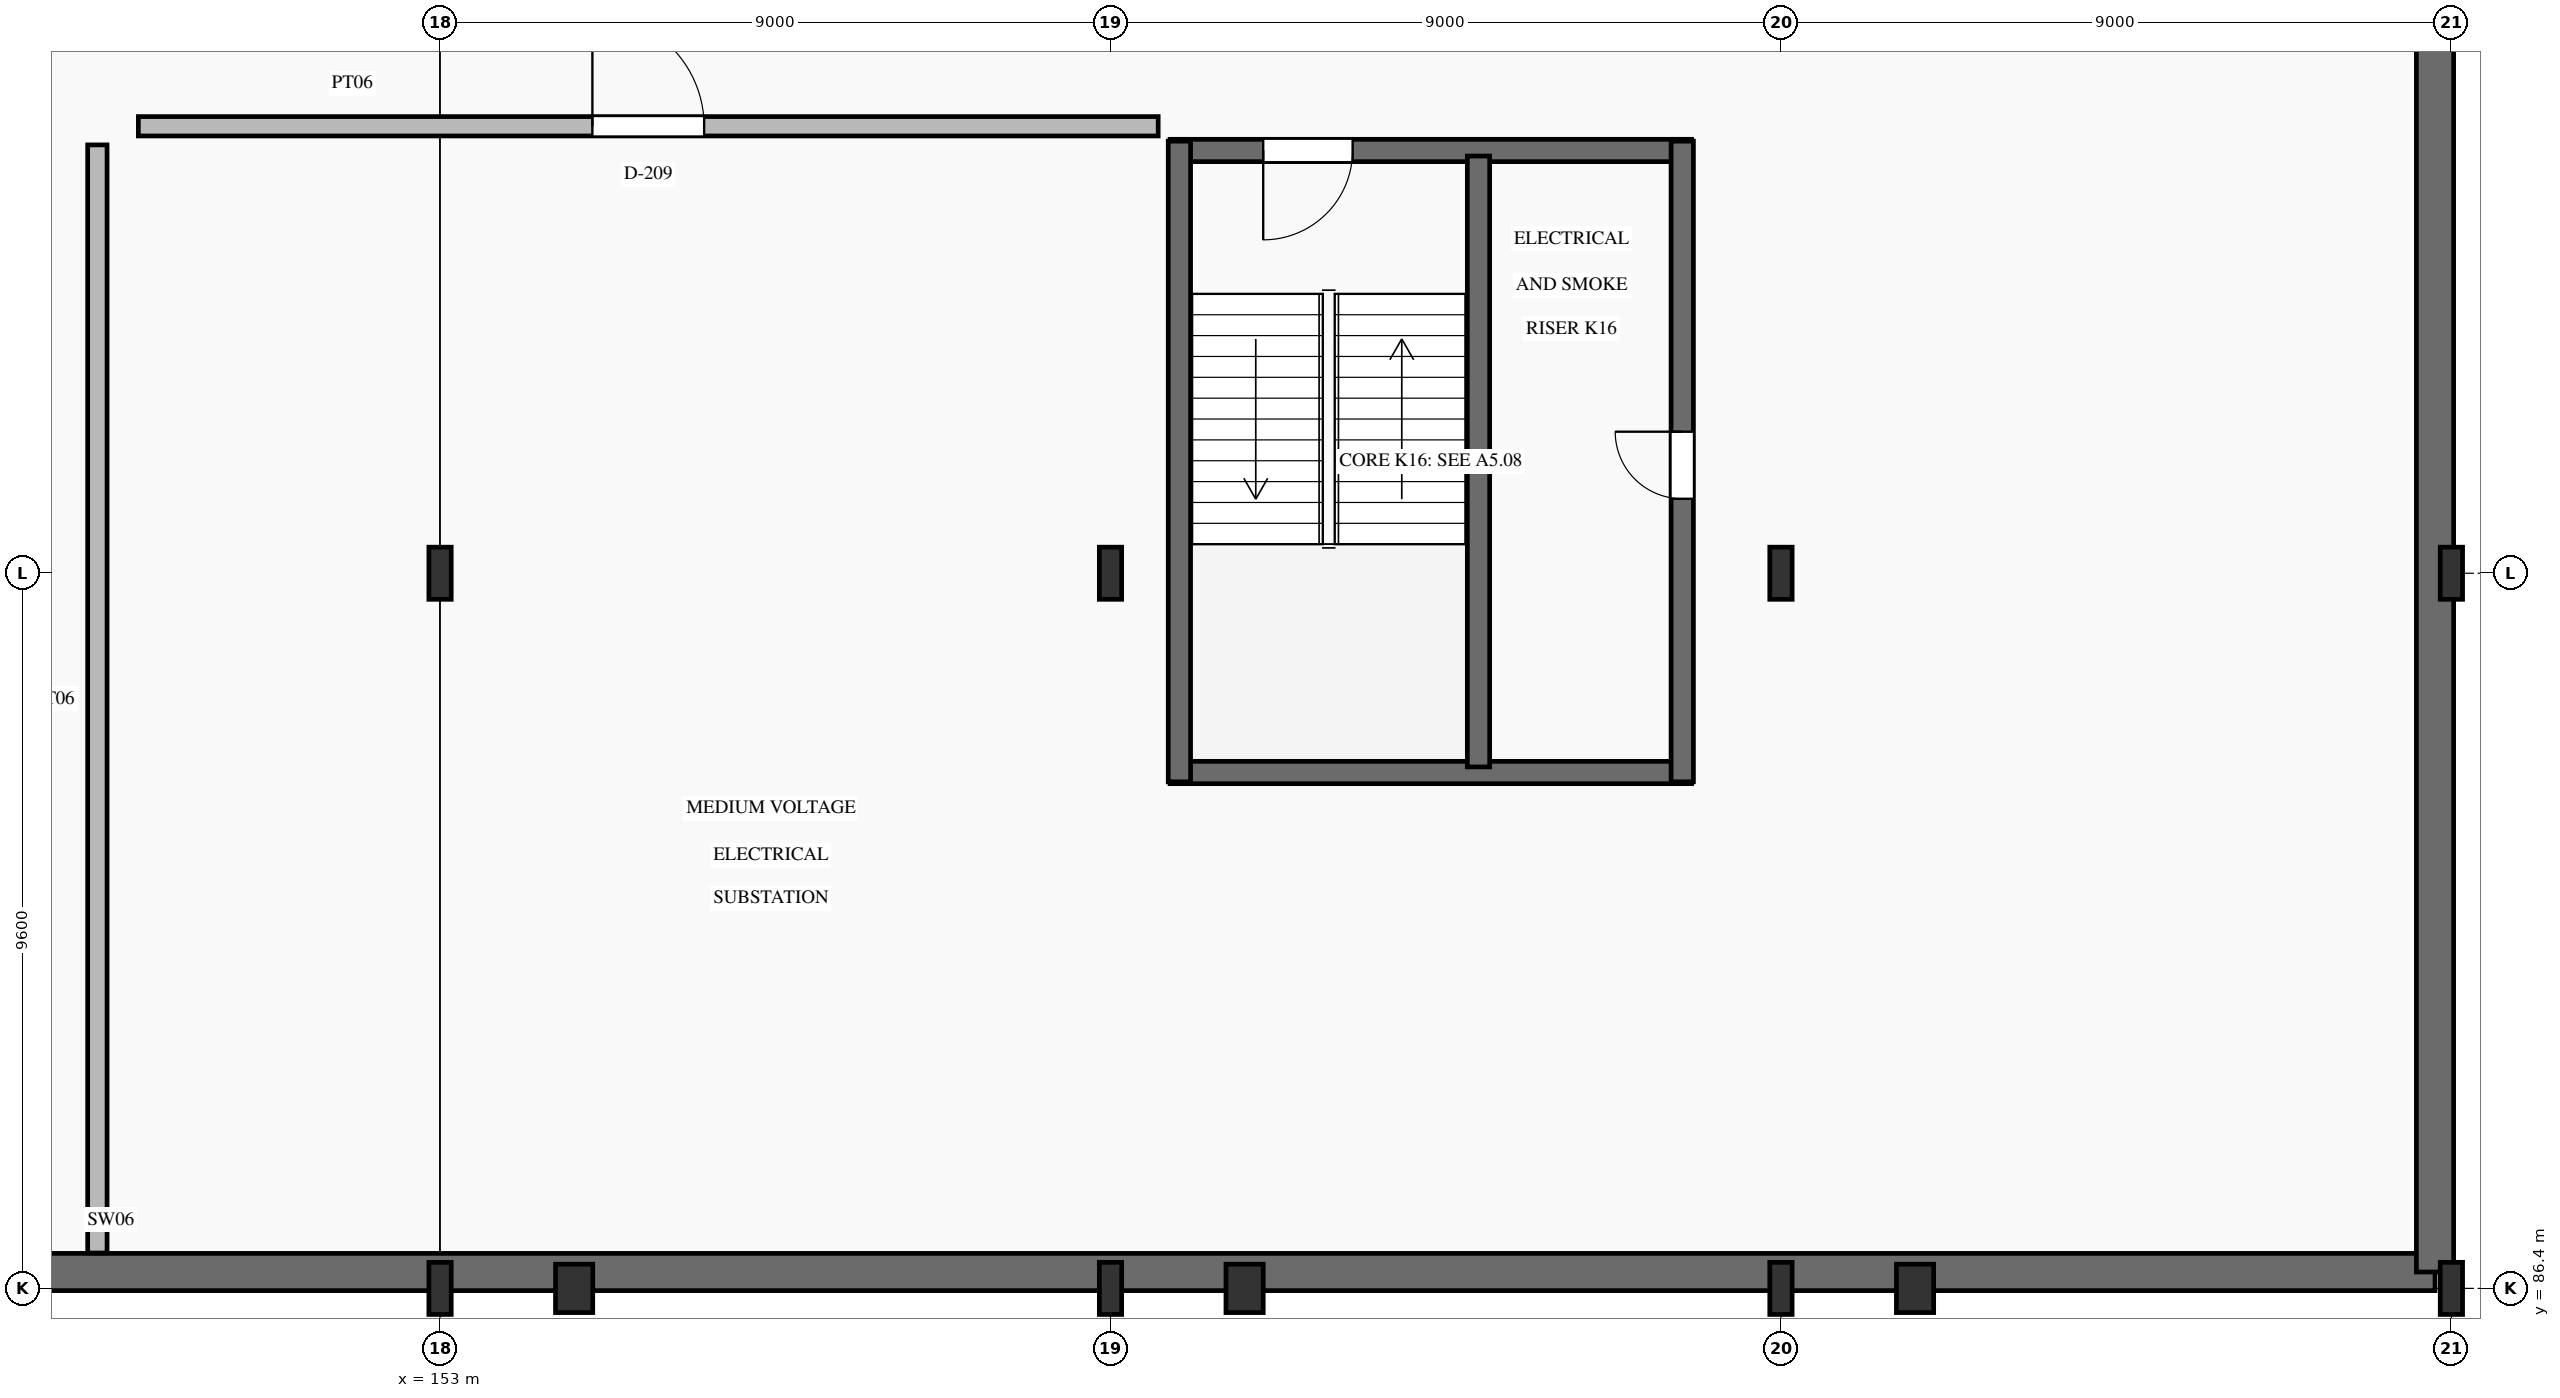
"""IFC4 building model, lengths in metres.
Left out: names, types, materials, properties, quantities, classifications, styles, units other than length and angle.
Written with IfcOpenShell. Run it as: python <this file> out.ifc"""

import sys

from ifc_helpers import new_model, si_unit, direction, frame, frame_2d, origin, origin_2d, place, context, subcontext, project, spatial, rectangle, i_section, extrude, element, fill, save


model = new_model("IFC4")
c1 = context("Model", 3, precision=1e-05, world=origin(), true_north=direction((0.0, 1.0)))
c2 = subcontext(c1, "Body", "Model", "MODEL_VIEW")
j1 = project(units=[si_unit("LENGTHUNIT", "METRE"), si_unit("PLANEANGLEUNIT", "RADIAN")], contexts=[c1])
p1 = place(None, origin())
s1 = spatial("IfcSite", under=j1, at=p1, CompositionType="ELEMENT")
p2 = place(p1, origin())
s2 = spatial("IfcBuilding", under=s1, at=p2, CompositionType="ELEMENT")
p3 = place(p2, frame((0.0, 0.0, -4.5)))
s3 = spatial("IfcBuildingStorey", under=s2, at=p3, CompositionType="ELEMENT", Elevation=-4.5)
for number, where, z_axis, x_axis in (
    (1, (153.0, 86.4, 0.0), (0.0, 0.0, 1.0), (1.0, 0.0, 0.0)),
    (2, (153.0, 96.0, 0.0), (0.0, 0.0, 1.0), (1.0, 0.0, 0.0)),
    (3, (162.0, 86.4, 0.0), (0.0, 0.0, 1.0), (1.0, 0.0, 0.0)),
    (4, (162.0, 96.0, 0.0), (0.0, 0.0, 1.0), (1.0, 0.0, 0.0)),
    (5, (171.0, 86.4, 0.0), (0.0, 0.0, 1.0), (1.0, 0.0, 0.0)),
    (6, (171.0, 96.0, 0.0), (0.0, 0.0, 1.0), (1.0, 0.0, 0.0)),
    (7, (180.0, 86.4, 0.0), (0.0, 0.0, 1.0), (1.0, 0.0, 0.0)),
    (8, (180.0, 96.0, 0.0), (0.0, 0.0, 1.0), (1.0, 0.0, 0.0)),
):
    element("IfcColumn", number, at=place(p3, frame(where, z_axis=z_axis, x_axis=x_axis)), inside=s3, PredefinedType="COLUMN", context=c2, shape_type="SweptSolid", body=[
        extrude(i_section(OverallWidth=0.3, OverallDepth=0.7, WebThickness=0.017, FlangeThickness=0.032, FilletRadius=0.027, at=origin_2d()), origin(), (0.0, 0.0, 1.0), 4.5),
    ])
for number, where, z_axis, x_axis in (
    (9, (154.8, 86.4, 0.0), (0.0, 0.0, 1.0), (1.0, 0.0, 0.0)),
    (10, (163.8, 86.4, 0.0), (0.0, 0.0, 1.0), (1.0, 0.0, 0.0)),
    (11, (172.8, 86.4, 0.0), (0.0, 0.0, 1.0), (1.0, 0.0, 0.0)),
):
    element("IfcColumn", number, at=place(p3, frame(where, z_axis=z_axis, x_axis=x_axis)), inside=s3, PredefinedType="PILASTER", context=c2, shape_type="SweptSolid", body=[
        extrude(rectangle(XDim=0.5, YDim=0.65, at=origin_2d()), origin(), (0.0, 0.0, 1.0), 4.5),
    ])
p4 = place(p3, frame((117.38, 86.62, 0.0), z_axis=(0.0, 0.0, 1.0), x_axis=(1.0, 0.0, 0.0)))
e12 = element("IfcWall", 12, at=p4, inside=s3, PredefinedType="SHEAR", context=c2, shape_type="SweptSolid", body=[
    extrude(rectangle(XDim=62.4, YDim=0.5, at=frame_2d((31.2, 0.0))), origin(), (0.0, 0.0, 1.0), 4.2),
])
p5 = place(p3, frame((179.78, 86.62, 0.0), z_axis=(0.0, 0.0, 1.0), x_axis=(0.0, 1.0, 0.0)))
e13 = element("IfcWall", 13, at=p5, inside=s3, PredefinedType="SHEAR", context=c2, shape_type="SweptSolid", body=[
    extrude(rectangle(XDim=37.96, YDim=0.5, at=frame_2d((18.98, 0.0))), origin(), (0.0, 0.0, 1.0), 4.2),
])
p6 = place(p3, frame((162.8, 93.325, 0.0), z_axis=(0.0, 0.0, 1.0), x_axis=(1.0, 0.0, 0.0)))
e14 = element("IfcWall", 14, at=p6, inside=s3, PredefinedType="SHEAR", context=c2, shape_type="SweptSolid", body=[
    extrude(rectangle(XDim=7.0, YDim=0.3, at=frame_2d((3.5, 0.0))), origin(), (0.0, 0.0, 1.0), 4.5),
])
p7 = place(p3, frame((162.8, 101.675, 0.0), z_axis=(0.0, 0.0, 1.0), x_axis=(1.0, 0.0, 0.0)))
e15 = element("IfcWall", 15, at=p7, inside=s3, PredefinedType="SHEAR", context=c2, shape_type="SweptSolid", body=[
    extrude(rectangle(XDim=7.0, YDim=0.3, at=frame_2d((3.5, 0.0))), origin(), (0.0, 0.0, 1.0), 4.5),
])
p8 = place(p7, frame((1.25, 0.0, 0.0)))
e16 = element("IfcOpeningElement", 16, at=p8, cuts=e15, PredefinedType="OPENING", context=c2, shape_type="SweptSolid", body=[
    extrude(rectangle(XDim=1.2, YDim=2.15, at=frame_2d((0.6, 1.075))), frame((0.0, 0.165, 0.0), z_axis=(0.0, -1.0, 0.0), x_axis=(1.0, 0.0, 0.0)), (0.0, 0.0, 1.0), 0.33),
])
p9 = place(p3, frame((162.925, 93.2, 0.0), z_axis=(0.0, 0.0, 1.0), x_axis=(0.0, 1.0, 0.0)))
e17 = element("IfcWall", 17, at=p9, inside=s3, PredefinedType="SHEAR", context=c2, shape_type="SweptSolid", body=[
    extrude(rectangle(XDim=8.6, YDim=0.3, at=frame_2d((4.3, 0.0))), origin(), (0.0, 0.0, 1.0), 4.5),
])
p10 = place(p3, frame((169.675, 93.2, 0.0), z_axis=(0.0, 0.0, 1.0), x_axis=(0.0, 1.0, 0.0)))
e18 = element("IfcWall", 18, at=p10, inside=s3, PredefinedType="SHEAR", context=c2, shape_type="SweptSolid", body=[
    extrude(rectangle(XDim=8.6, YDim=0.3, at=frame_2d((4.3, 0.0))), origin(), (0.0, 0.0, 1.0), 4.5),
])
p11 = place(p10, frame((3.8, 0.0, 0.0)))
e19 = element("IfcOpeningElement", 19, at=p11, cuts=e18, PredefinedType="OPENING", context=c2, shape_type="SweptSolid", body=[
    extrude(rectangle(XDim=0.9, YDim=2.05, at=frame_2d((0.45, 1.025))), frame((0.0, 0.165, 0.0), z_axis=(0.0, -1.0, 0.0), x_axis=(1.0, 0.0, 0.0)), (0.0, 0.0, 1.0), 0.33),
])
p12 = place(p3, frame((166.94, 93.4, 0.0), z_axis=(0.0, 0.0, 1.0), x_axis=(0.0, 1.0, 0.0)))
e20 = element("IfcWall", 20, at=p12, inside=s3, PredefinedType="SHEAR", context=c2, shape_type="SweptSolid", body=[
    extrude(rectangle(XDim=8.2, YDim=0.3, at=frame_2d((4.1, 0.0))), origin(), (0.0, 0.0, 1.0), 4.5),
])
p13 = place(p3, frame((148.95, 102.0, 0.0), z_axis=(0.0, 0.0, 1.0), x_axis=(1.0, 0.0, 0.0)))
e21 = element("IfcWall", 21, at=p13, inside=s3, PredefinedType="PARTITIONING", context=c2, shape_type="SweptSolid", body=[
    extrude(rectangle(XDim=13.69, YDim=0.26, at=frame_2d((6.845, 0.0))), origin(), (0.0, 0.0, 1.0), 4.2),
])
p14 = place(p13, frame((6.095, 0.0, 0.0)))
e22 = element("IfcOpeningElement", 22, at=p14, cuts=e21, PredefinedType="OPENING", context=c2, shape_type="SweptSolid", body=[
    extrude(rectangle(XDim=1.5, YDim=2.25, at=frame_2d((0.75, 1.125))), frame((0.0, 0.145, 0.0), z_axis=(0.0, -1.0, 0.0), x_axis=(1.0, 0.0, 0.0)), (0.0, 0.0, 1.0), 0.29),
])
p15 = place(p3, frame((148.4, 86.875, 0.0), z_axis=(0.0, 0.0, 1.0), x_axis=(0.0, 1.0, 0.0)))
e23 = element("IfcWall", 23, at=p15, inside=s3, PredefinedType="PARTITIONING", context=c2, shape_type="SweptSolid", body=[
    extrude(rectangle(XDim=14.875, YDim=0.26, at=frame_2d((7.438, 0.0))), origin(), (0.0, 0.0, 1.0), 4.2),
])
p16 = place(p8, frame((1.2, 0.0, 0.0), z_axis=(0.0, 0.0, 1.0), x_axis=(-1.0, 0.0, 0.0)))
e24 = element("IfcDoor", 24, at=p16, inside=s3, OperationType="SINGLE_SWING_LEFT", PredefinedType="DOOR", context=c2, shape_type="SweptSolid", body=[
    extrude(rectangle(XDim=1.2, YDim=2.15, at=frame_2d((0.6, 1.075))), frame((0.0, 0.025, 0.0), z_axis=(0.0, -1.0, 0.0), x_axis=(1.0, 0.0, 0.0)), (0.0, 0.0, 1.0), 0.05),
])
fill(e16, e24)
p17 = place(p11, origin())
e25 = element("IfcDoor", 25, at=p17, inside=s3, OperationType="SINGLE_SWING_RIGHT", PredefinedType="DOOR", context=c2, shape_type="SweptSolid", body=[
    extrude(rectangle(XDim=0.9, YDim=2.05, at=frame_2d((0.45, 1.025))), frame((0.0, 0.025, 0.0), z_axis=(0.0, -1.0, 0.0), x_axis=(1.0, 0.0, 0.0)), (0.0, 0.0, 1.0), 0.05),
])
fill(e19, e25)
p18 = place(p14, origin())
e26 = element("IfcDoor", 26, at=p18, inside=s3, OperationType="SINGLE_SWING_LEFT", PredefinedType="DOOR", context=c2, shape_type="SweptSolid", body=[
    extrude(rectangle(XDim=1.5, YDim=2.25, at=frame_2d((0.75, 1.125))), frame((0.0, 0.025, 0.0), z_axis=(0.0, -1.0, 0.0), x_axis=(1.0, 0.0, 0.0)), (0.0, 0.0, 1.0), 0.05),
])
fill(e22, e26)
save(model, sys.argv[1])
